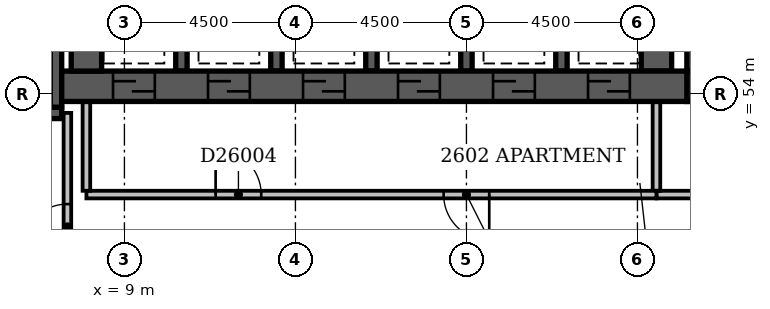
"""IFC4 building model, lengths in metres.
Left out: names, types, materials, properties, quantities, classifications, styles, units other than length and angle.
Written with IfcOpenShell. Run it as: python <this file> out.ifc"""

import sys

from ifc_helpers import new_model, si_unit, direction, frame, frame_2d, origin, place, context, subcontext, project, spatial, rectangle, extrude, element, fill, save


model = new_model("IFC4")
c1 = context("Model", 3, precision=1e-05, world=origin(), true_north=direction((0.0, 1.0)))
c2 = subcontext(c1, "Body", "Model", "MODEL_VIEW")
j1 = project(units=[si_unit("LENGTHUNIT", "METRE"), si_unit("PLANEANGLEUNIT", "RADIAN")], contexts=[c1])
p1 = place(None, origin())
s1 = spatial("IfcSite", under=j1, at=p1, CompositionType="ELEMENT")
p2 = place(p1, origin())
s2 = spatial("IfcBuilding", under=s1, at=p2, CompositionType="ELEMENT")
p3 = place(p2, frame((0.0, 0.0, 104.6)))
s3 = spatial("IfcBuildingStorey", under=s2, at=p3, CompositionType="ELEMENT", Elevation=104.6)
p4 = place(p3, frame((0.35, 53.5, -0.3), z_axis=(0.0, 0.0, 1.0), x_axis=(1.0, 0.0, 0.0)))
e1 = element("IfcWall", 1, at=p4, inside=s3, PredefinedType="SHEAR", context=c2, shape_type="SweptSolid", body=[
    extrude(rectangle(XDim=7.0, YDim=0.3, at=frame_2d((3.5, 0.0))), origin(), (0.0, 0.0, 1.0), 3.45),
])
p5 = place(p4, frame((5.58, 0.0, 0.3)))
e2 = element("IfcOpeningElement", 2, at=p5, cuts=e1, PredefinedType="OPENING", context=c2, shape_type="SweptSolid", body=[
    extrude(rectangle(XDim=1.1, YDim=2.1, at=frame_2d((0.55, 1.05))), frame((0.0, 0.162, 0.0), z_axis=(0.0, -1.0, 0.0), x_axis=(1.0, 0.0, 0.0)), (0.0, 0.0, 1.0), 0.324),
])
p6 = place(p3, frame((7.2, 53.65, -0.3), z_axis=(0.0, 0.0, 1.0), x_axis=(0.0, 1.0, 0.0)))
e3 = element("IfcWall", 3, at=p6, inside=s3, PredefinedType="SHEAR", context=c2, shape_type="SweptSolid", body=[
    extrude(rectangle(XDim=4.2, YDim=0.3, at=frame_2d((2.1, 0.0))), origin(), (0.0, 0.0, 1.0), 3.45),
])
p7 = place(p3, frame((7.35, 54.2, -0.3), z_axis=(0.0, 0.0, 1.0), x_axis=(1.0, 0.0, 0.0)))
e4 = element("IfcWall", 4, at=p7, inside=s3, PredefinedType="SHEAR", context=c2, shape_type="SweptSolid", body=[
    extrude(rectangle(XDim=16.45, YDim=0.8, at=frame_2d((8.225, 0.0))), origin(), (0.0, 0.0, 1.0), 3.45),
])
p8 = place(p7, frame((1.35, 0.0, 0.3)))
e5 = element("IfcOpeningElement", 5, at=p8, cuts=e4, PredefinedType="OPENING", context=c2, shape_type="SweptSolid", body=[
    extrude(rectangle(XDim=1.1, YDim=2.1, at=frame_2d((0.55, 1.05))), frame((0.0, 0.412, 0.0), z_axis=(0.0, -1.0, 0.0), x_axis=(1.0, 0.0, 0.0)), (0.0, 0.0, 1.0), 0.824),
])
p9 = place(p7, frame((3.85, 0.0, 0.3)))
e6 = element("IfcOpeningElement", 6, at=p9, cuts=e4, PredefinedType="OPENING", context=c2, shape_type="SweptSolid", body=[
    extrude(rectangle(XDim=1.1, YDim=2.1, at=frame_2d((0.55, 1.05))), frame((0.0, 0.412, 0.0), z_axis=(0.0, -1.0, 0.0), x_axis=(1.0, 0.0, 0.0)), (0.0, 0.0, 1.0), 0.824),
])
p10 = place(p7, frame((6.35, 0.0, 0.3)))
e7 = element("IfcOpeningElement", 7, at=p10, cuts=e4, PredefinedType="OPENING", context=c2, shape_type="SweptSolid", body=[
    extrude(rectangle(XDim=1.1, YDim=2.1, at=frame_2d((0.55, 1.05))), frame((0.0, 0.412, 0.0), z_axis=(0.0, -1.0, 0.0), x_axis=(1.0, 0.0, 0.0)), (0.0, 0.0, 1.0), 0.824),
])
p11 = place(p7, frame((8.85, 0.0, 0.3)))
e8 = element("IfcOpeningElement", 8, at=p11, cuts=e4, PredefinedType="OPENING", context=c2, shape_type="SweptSolid", body=[
    extrude(rectangle(XDim=1.1, YDim=2.1, at=frame_2d((0.55, 1.05))), frame((0.0, 0.412, 0.0), z_axis=(0.0, -1.0, 0.0), x_axis=(1.0, 0.0, 0.0)), (0.0, 0.0, 1.0), 0.824),
])
p12 = place(p7, frame((11.35, 0.0, 0.3)))
e9 = element("IfcOpeningElement", 9, at=p12, cuts=e4, PredefinedType="OPENING", context=c2, shape_type="SweptSolid", body=[
    extrude(rectangle(XDim=1.1, YDim=2.1, at=frame_2d((0.55, 1.05))), frame((0.0, 0.412, 0.0), z_axis=(0.0, -1.0, 0.0), x_axis=(1.0, 0.0, 0.0)), (0.0, 0.0, 1.0), 0.824),
])
p13 = place(p7, frame((13.85, 0.0, 0.3)))
e10 = element("IfcOpeningElement", 10, at=p13, cuts=e4, PredefinedType="OPENING", context=c2, shape_type="SweptSolid", body=[
    extrude(rectangle(XDim=1.1, YDim=2.1, at=frame_2d((0.55, 1.05))), frame((0.0, 0.412, 0.0), z_axis=(0.0, -1.0, 0.0), x_axis=(1.0, 0.0, 0.0)), (0.0, 0.0, 1.0), 0.824),
])
p14 = place(p3, frame((8.0, 54.6, -0.3), z_axis=(0.0, 0.0, 1.0), x_axis=(0.0, 1.0, 0.0)))
e11 = element("IfcWall", 11, at=p14, inside=s3, PredefinedType="SHEAR", context=c2, shape_type="SweptSolid", body=[
    extrude(rectangle(XDim=3.0, YDim=0.8, at=frame_2d((1.5, 0.0))), origin(), (0.0, 0.0, 1.0), 3.45),
])
for number, where, z_axis, x_axis in (
    (12, (10.5, 54.6, -0.3), (0.0, 0.0, 1.0), (0.0, 1.0, 0.0)),
    (13, (13.0, 54.6, -0.3), (0.0, 0.0, 1.0), (0.0, 1.0, 0.0)),
    (14, (15.5, 54.6, -0.3), (0.0, 0.0, 1.0), (0.0, 1.0, 0.0)),
    (15, (18.0, 54.6, -0.3), (0.0, 0.0, 1.0), (0.0, 1.0, 0.0)),
    (16, (20.5, 54.6, -0.3), (0.0, 0.0, 1.0), (0.0, 1.0, 0.0)),
):
    element("IfcWall", number, at=place(p3, frame(where, z_axis=z_axis, x_axis=x_axis)), inside=s3, PredefinedType="SHEAR", context=c2, shape_type="SweptSolid", body=[
        extrude(rectangle(XDim=3.0, YDim=0.3, at=frame_2d((1.5, 0.0))), origin(), (0.0, 0.0, 1.0), 3.45),
    ])
p15 = place(p3, frame((23.0, 54.6, -0.3), z_axis=(0.0, 0.0, 1.0), x_axis=(0.0, 1.0, 0.0)))
e17 = element("IfcWall", 17, at=p15, inside=s3, PredefinedType="SHEAR", context=c2, shape_type="SweptSolid", body=[
    extrude(rectangle(XDim=3.0, YDim=0.8, at=frame_2d((1.5, 0.0))), origin(), (0.0, 0.0, 1.0), 3.45),
])
p16 = place(p3, frame((23.8, 54.2, -0.3), z_axis=(0.0, 0.0, 1.0), x_axis=(1.0, 0.0, 0.0)))
e18 = element("IfcWall", 18, at=p16, inside=s3, PredefinedType="SHEAR", context=c2, shape_type="SweptSolid", body=[
    extrude(rectangle(XDim=3.3, YDim=0.8, at=frame_2d((1.65, 0.0))), origin(), (0.0, 0.0, 1.0), 3.45),
])
p17 = place(p16, frame((1.1, 0.0, 0.3)))
e19 = element("IfcOpeningElement", 19, at=p17, cuts=e18, PredefinedType="OPENING", context=c2, shape_type="SweptSolid", body=[
    extrude(rectangle(XDim=1.1, YDim=2.1, at=frame_2d((0.55, 1.05))), frame((0.0, 0.412, 0.0), z_axis=(0.0, -1.0, 0.0), x_axis=(1.0, 0.0, 0.0)), (0.0, 0.0, 1.0), 0.824),
])
p18 = place(p3, frame((24.2, 54.6, -0.3), z_axis=(0.0, 0.0, 1.0), x_axis=(0.0, 1.0, 0.0)))
e20 = element("IfcWall", 20, at=p18, inside=s3, PredefinedType="SHEAR", context=c2, shape_type="SweptSolid", body=[
    extrude(rectangle(XDim=3.0, YDim=0.8, at=frame_2d((1.5, 0.0))), origin(), (0.0, 0.0, 1.0), 3.45),
])
p19 = place(p3, frame((8.0, 51.35, 0.0), z_axis=(0.0, 0.0, 1.0), x_axis=(1.0, 0.0, 0.0)))
e21 = element("IfcWall", 21, at=p19, inside=s3, PredefinedType="PARTITIONING", context=c2, shape_type="SweptSolid", body=[
    extrude(rectangle(XDim=15.0, YDim=0.2, at=frame_2d((7.5, 0.0))), origin(), (0.0, 0.0, 1.0), 3.15),
])
p20 = place(p19, frame((3.4, 0.0, 0.0)))
e22 = element("IfcOpeningElement", 22, at=p20, cuts=e21, PredefinedType="OPENING", context=c2, shape_type="SweptSolid", body=[
    extrude(rectangle(XDim=1.2, YDim=2.1, at=frame_2d((0.6, 1.05))), frame((0.0, 0.112, 0.0), z_axis=(0.0, -1.0, 0.0), x_axis=(1.0, 0.0, 0.0)), (0.0, 0.0, 1.0), 0.224),
])
p21 = place(p19, frame((9.4, 0.0, 0.0)))
e23 = element("IfcOpeningElement", 23, at=p21, cuts=e21, PredefinedType="OPENING", context=c2, shape_type="SweptSolid", body=[
    extrude(rectangle(XDim=1.2, YDim=2.1, at=frame_2d((0.6, 1.05))), frame((0.0, 0.112, 0.0), z_axis=(0.0, -1.0, 0.0), x_axis=(1.0, 0.0, 0.0)), (0.0, 0.0, 1.0), 0.224),
])
for number, where, z_axis, x_axis in (
    (24, (23.0, 51.45, 0.0), (0.0, 0.0, 1.0), (0.0, 1.0, 0.0)),
    (25, (8.0, 51.45, 0.0), (0.0, 0.0, 1.0), (0.0, 1.0, 0.0)),
):
    element("IfcWall", number, at=place(p3, frame(where, z_axis=z_axis, x_axis=x_axis)), inside=s3, PredefinedType="PARTITIONING", context=c2, shape_type="SweptSolid", body=[
        extrude(rectangle(XDim=2.33, YDim=0.2, at=frame_2d((1.165, 0.0))), origin(), (0.0, 0.0, 1.0), 3.15),
    ])
p22 = place(p3, frame((23.0, 51.35, 0.0), z_axis=(0.0, 0.0, 1.0), x_axis=(1.0, 0.0, 0.0)))
e26 = element("IfcWall", 26, at=p22, inside=s3, PredefinedType="PARTITIONING", context=c2, shape_type="SweptSolid", body=[
    extrude(rectangle(XDim=4.8, YDim=0.2, at=frame_2d((2.4, 0.0))), origin(), (0.0, 0.0, 1.0), 3.15),
])
p23 = place(p22, frame((1.65, 0.0, 0.0)))
e27 = element("IfcOpeningElement", 27, at=p23, cuts=e26, PredefinedType="OPENING", context=c2, shape_type="SweptSolid", body=[
    extrude(rectangle(XDim=1.2, YDim=2.1, at=frame_2d((0.6, 1.05))), frame((0.0, 0.112, 0.0), z_axis=(0.0, -1.0, 0.0), x_axis=(1.0, 0.0, 0.0)), (0.0, 0.0, 1.0), 0.224),
])
p24 = place(p3, frame((7.5, 49.6, 0.0), z_axis=(0.0, 0.0, 1.0), x_axis=(0.0, 1.0, 0.0)))
e28 = element("IfcWall", 28, at=p24, inside=s3, PredefinedType="PARTITIONING", context=c2, shape_type="SweptSolid", body=[
    extrude(rectangle(XDim=3.9, YDim=0.2, at=frame_2d((1.95, 0.0))), origin(), (0.0, 0.0, 1.0), 3.15),
])
p25 = place(p24, frame((0.3, 0.0, 0.0)))
e29 = element("IfcOpeningElement", 29, at=p25, cuts=e28, PredefinedType="OPENING", context=c2, shape_type="SweptSolid", body=[
    extrude(rectangle(XDim=1.2, YDim=2.1, at=frame_2d((0.6, 1.05))), frame((0.0, 0.112, 0.0), z_axis=(0.0, -1.0, 0.0), x_axis=(1.0, 0.0, 0.0)), (0.0, 0.0, 1.0), 0.224),
])
p26 = place(p25, origin())
e30 = element("IfcDoor", 30, at=p26, inside=s3, OperationType="SINGLE_SWING_LEFT", PredefinedType="DOOR", context=c2, shape_type="SweptSolid", body=[
    extrude(rectangle(XDim=1.2, YDim=2.1, at=frame_2d((0.6, 1.05))), frame((0.0, 0.025, 0.0), z_axis=(0.0, -1.0, 0.0), x_axis=(1.0, 0.0, 0.0)), (0.0, 0.0, 1.0), 0.05),
])
fill(e29, e30)
p27 = place(p8, origin())
e31 = element("IfcDoor", 31, at=p27, inside=s3, OperationType="SLIDING_TO_LEFT", PredefinedType="DOOR", context=c2, shape_type="SweptSolid", body=[
    extrude(rectangle(XDim=1.1, YDim=2.1, at=frame_2d((0.55, 1.05))), frame((0.0, 0.025, 0.0), z_axis=(0.0, -1.0, 0.0), x_axis=(1.0, 0.0, 0.0)), (0.0, 0.0, 1.0), 0.05),
])
fill(e5, e31)
p28 = place(p9, origin())
e32 = element("IfcDoor", 32, at=p28, inside=s3, OperationType="SLIDING_TO_LEFT", PredefinedType="DOOR", context=c2, shape_type="SweptSolid", body=[
    extrude(rectangle(XDim=1.1, YDim=2.1, at=frame_2d((0.55, 1.05))), frame((0.0, 0.025, 0.0), z_axis=(0.0, -1.0, 0.0), x_axis=(1.0, 0.0, 0.0)), (0.0, 0.0, 1.0), 0.05),
])
fill(e6, e32)
p29 = place(p10, origin())
e33 = element("IfcDoor", 33, at=p29, inside=s3, OperationType="SLIDING_TO_LEFT", PredefinedType="DOOR", context=c2, shape_type="SweptSolid", body=[
    extrude(rectangle(XDim=1.1, YDim=2.1, at=frame_2d((0.55, 1.05))), frame((0.0, 0.025, 0.0), z_axis=(0.0, -1.0, 0.0), x_axis=(1.0, 0.0, 0.0)), (0.0, 0.0, 1.0), 0.05),
])
fill(e7, e33)
p30 = place(p11, origin())
e34 = element("IfcDoor", 34, at=p30, inside=s3, OperationType="SLIDING_TO_LEFT", PredefinedType="DOOR", context=c2, shape_type="SweptSolid", body=[
    extrude(rectangle(XDim=1.1, YDim=2.1, at=frame_2d((0.55, 1.05))), frame((0.0, 0.025, 0.0), z_axis=(0.0, -1.0, 0.0), x_axis=(1.0, 0.0, 0.0)), (0.0, 0.0, 1.0), 0.05),
])
fill(e8, e34)
p31 = place(p12, origin())
e35 = element("IfcDoor", 35, at=p31, inside=s3, OperationType="SLIDING_TO_LEFT", PredefinedType="DOOR", context=c2, shape_type="SweptSolid", body=[
    extrude(rectangle(XDim=1.1, YDim=2.1, at=frame_2d((0.55, 1.05))), frame((0.0, 0.025, 0.0), z_axis=(0.0, -1.0, 0.0), x_axis=(1.0, 0.0, 0.0)), (0.0, 0.0, 1.0), 0.05),
])
fill(e9, e35)
p32 = place(p13, origin())
e36 = element("IfcDoor", 36, at=p32, inside=s3, OperationType="SLIDING_TO_LEFT", PredefinedType="DOOR", context=c2, shape_type="SweptSolid", body=[
    extrude(rectangle(XDim=1.1, YDim=2.1, at=frame_2d((0.55, 1.05))), frame((0.0, 0.025, 0.0), z_axis=(0.0, -1.0, 0.0), x_axis=(1.0, 0.0, 0.0)), (0.0, 0.0, 1.0), 0.05),
])
fill(e10, e36)
p33 = place(p20, origin())
e37 = element("IfcDoor", 37, at=p33, inside=s3, OperationType="SINGLE_SWING_LEFT", PredefinedType="DOOR", context=c2, shape_type="SweptSolid", body=[
    extrude(rectangle(XDim=1.2, YDim=2.1, at=frame_2d((0.6, 1.05))), frame((0.0, 0.025, 0.0), z_axis=(0.0, -1.0, 0.0), x_axis=(1.0, 0.0, 0.0)), (0.0, 0.0, 1.0), 0.05),
])
fill(e22, e37)
p34 = place(p21, origin())
e38 = element("IfcDoor", 38, at=p34, inside=s3, OperationType="SINGLE_SWING_RIGHT", PredefinedType="DOOR", context=c2, shape_type="SweptSolid", body=[
    extrude(rectangle(XDim=1.2, YDim=2.1, at=frame_2d((0.6, 1.05))), frame((0.0, 0.025, 0.0), z_axis=(0.0, -1.0, 0.0), x_axis=(1.0, 0.0, 0.0)), (0.0, 0.0, 1.0), 0.05),
])
fill(e23, e38)
save(model, sys.argv[1])
